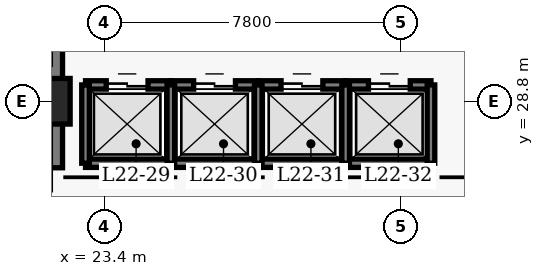
"""IFC4 building model, lengths in metres.
Left out: names, types, materials, properties, quantities, classifications, styles, units other than length and angle.
Written with IfcOpenShell. Run it as: python <this file> out.ifc"""

import sys

from ifc_helpers import new_model, si_unit, direction, frame, frame_2d, origin, origin_2d, place, context, subcontext, project, spatial, rectangle, extrude, element, fill, save


model = new_model("IFC4")
c1 = context("Model", 3, precision=1e-05, world=origin(), true_north=direction((0.0, 1.0)))
c2 = subcontext(c1, "Body", "Model", "MODEL_VIEW")
j1 = project(units=[si_unit("LENGTHUNIT", "METRE"), si_unit("PLANEANGLEUNIT", "RADIAN")], contexts=[c1])
p1 = place(None, origin())
s1 = spatial("IfcSite", under=j1, at=p1, CompositionType="ELEMENT")
p2 = place(p1, origin())
s2 = spatial("IfcBuilding", under=s1, at=p2, CompositionType="ELEMENT")
p3 = place(p2, frame((0.0, 0.0, 91.8)))
s3 = spatial("IfcBuildingStorey", under=s2, at=p3, CompositionType="ELEMENT", Elevation=91.8)
p4 = place(p3, frame((21.9, 27.05, 0.0), z_axis=(0.0, 0.0, 1.0), x_axis=(0.0, 1.0, 0.0)))
e1 = element("IfcWall", 1, at=p4, inside=s3, PredefinedType="SHEAR", context=c2, shape_type="SweptSolid", body=[
    extrude(rectangle(XDim=13.67, YDim=0.8, at=frame_2d((6.835, 0.0))), origin(), (0.0, 0.0, 1.0), 3.8),
])
p5 = place(p3, frame((21.9, 28.8, 0.0), z_axis=(0.0, 0.0, 1.0), x_axis=(1.0, 0.0, 0.0)))
e2 = element("IfcColumn", 2, at=p5, inside=s3, PredefinedType="COLUMN", context=c2, shape_type="SweptSolid", body=[
    extrude(rectangle(XDim=1.2, YDim=1.2, at=origin_2d()), origin(), (0.0, 0.0, 1.0), 3.8),
])
p6 = place(p3, frame((22.905, 29.23, 0.0), z_axis=(0.0, 0.0, 1.0), x_axis=(1.0, 0.0, 0.0)))
e3 = element("IfcWall", 3, at=p6, inside=s3, PredefinedType="SHEAR", context=c2, shape_type="SweptSolid", body=[
    extrude(rectangle(XDim=2.245, YDim=0.22, at=frame_2d((1.123, 0.0))), origin(), (0.0, 0.0, 1.0), 3.8),
])
p7 = place(p6, frame((0.545, 0.0, 0.0)))
e4 = element("IfcOpeningElement", 4, at=p7, cuts=e3, PredefinedType="OPENING", context=c2, shape_type="SweptSolid", body=[
    extrude(rectangle(XDim=1.1, YDim=2.15, at=frame_2d((0.55, 1.075))), frame((0.0, 0.12, 0.0), z_axis=(0.0, -1.0, 0.0), x_axis=(1.0, 0.0, 0.0)), (0.0, 0.0, 1.0), 0.24),
])
p8 = place(p3, frame((22.905, 27.17, 0.0), z_axis=(0.0, 0.0, 1.0), x_axis=(1.0, 0.0, 0.0)))
e5 = element("IfcWall", 5, at=p8, inside=s3, PredefinedType="SHEAR", context=c2, shape_type="SweptSolid", body=[
    extrude(rectangle(XDim=2.245, YDim=0.22, at=frame_2d((1.123, 0.0))), origin(), (0.0, 0.0, 1.0), 3.8),
])
p9 = place(p3, frame((22.905, 27.17, 0.0), z_axis=(0.0, 0.0, 1.0), x_axis=(0.0, 1.0, 0.0)))
e6 = element("IfcWall", 6, at=p9, inside=s3, PredefinedType="SHEAR", context=c2, shape_type="SweptSolid", body=[
    extrude(rectangle(XDim=2.06, YDim=0.2, at=frame_2d((1.03, 0.0))), origin(), (0.0, 0.0, 1.0), 3.8),
])
p10 = place(p3, frame((25.15, 29.23, 0.0), z_axis=(0.0, 0.0, 1.0), x_axis=(1.0, 0.0, 0.0)))
e7 = element("IfcWall", 7, at=p10, inside=s3, PredefinedType="SHEAR", context=c2, shape_type="SweptSolid", body=[
    extrude(rectangle(XDim=2.3, YDim=0.22, at=frame_2d((1.15, 0.0))), origin(), (0.0, 0.0, 1.0), 3.8),
])
p11 = place(p10, frame((0.6, 0.0, 0.0)))
e8 = element("IfcOpeningElement", 8, at=p11, cuts=e7, PredefinedType="OPENING", context=c2, shape_type="SweptSolid", body=[
    extrude(rectangle(XDim=1.1, YDim=2.15, at=frame_2d((0.55, 1.075))), frame((0.0, 0.12, 0.0), z_axis=(0.0, -1.0, 0.0), x_axis=(1.0, 0.0, 0.0)), (0.0, 0.0, 1.0), 0.24),
])
p12 = place(p3, frame((25.15, 27.17, 0.0), z_axis=(0.0, 0.0, 1.0), x_axis=(1.0, 0.0, 0.0)))
e9 = element("IfcWall", 9, at=p12, inside=s3, PredefinedType="SHEAR", context=c2, shape_type="SweptSolid", body=[
    extrude(rectangle(XDim=2.3, YDim=0.22, at=frame_2d((1.15, 0.0))), origin(), (0.0, 0.0, 1.0), 3.8),
])
p13 = place(p3, frame((25.15, 27.17, 0.0), z_axis=(0.0, 0.0, 1.0), x_axis=(0.0, 1.0, 0.0)))
e10 = element("IfcWall", 10, at=p13, inside=s3, PredefinedType="SHEAR", context=c2, shape_type="SweptSolid", body=[
    extrude(rectangle(XDim=2.06, YDim=0.2, at=frame_2d((1.03, 0.0))), origin(), (0.0, 0.0, 1.0), 3.8),
])
p14 = place(p3, frame((27.45, 29.23, 0.0), z_axis=(0.0, 0.0, 1.0), x_axis=(1.0, 0.0, 0.0)))
e11 = element("IfcWall", 11, at=p14, inside=s3, PredefinedType="SHEAR", context=c2, shape_type="SweptSolid", body=[
    extrude(rectangle(XDim=2.3, YDim=0.22, at=frame_2d((1.15, 0.0))), origin(), (0.0, 0.0, 1.0), 3.8),
])
p15 = place(p14, frame((0.6, 0.0, 0.0)))
e12 = element("IfcOpeningElement", 12, at=p15, cuts=e11, PredefinedType="OPENING", context=c2, shape_type="SweptSolid", body=[
    extrude(rectangle(XDim=1.1, YDim=2.15, at=frame_2d((0.55, 1.075))), frame((0.0, 0.12, 0.0), z_axis=(0.0, -1.0, 0.0), x_axis=(1.0, 0.0, 0.0)), (0.0, 0.0, 1.0), 0.24),
])
p16 = place(p3, frame((27.45, 27.17, 0.0), z_axis=(0.0, 0.0, 1.0), x_axis=(1.0, 0.0, 0.0)))
e13 = element("IfcWall", 13, at=p16, inside=s3, PredefinedType="SHEAR", context=c2, shape_type="SweptSolid", body=[
    extrude(rectangle(XDim=2.3, YDim=0.22, at=frame_2d((1.15, 0.0))), origin(), (0.0, 0.0, 1.0), 3.8),
])
p17 = place(p3, frame((27.45, 27.17, 0.0), z_axis=(0.0, 0.0, 1.0), x_axis=(0.0, 1.0, 0.0)))
e14 = element("IfcWall", 14, at=p17, inside=s3, PredefinedType="SHEAR", context=c2, shape_type="SweptSolid", body=[
    extrude(rectangle(XDim=2.06, YDim=0.2, at=frame_2d((1.03, 0.0))), origin(), (0.0, 0.0, 1.0), 3.8),
])
p18 = place(p3, frame((29.75, 29.23, 0.0), z_axis=(0.0, 0.0, 1.0), x_axis=(1.0, 0.0, 0.0)))
e15 = element("IfcWall", 15, at=p18, inside=s3, PredefinedType="SHEAR", context=c2, shape_type="SweptSolid", body=[
    extrude(rectangle(XDim=2.245, YDim=0.22, at=frame_2d((1.123, 0.0))), origin(), (0.0, 0.0, 1.0), 3.8),
])
p19 = place(p18, frame((0.6, 0.0, 0.0)))
e16 = element("IfcOpeningElement", 16, at=p19, cuts=e15, PredefinedType="OPENING", context=c2, shape_type="SweptSolid", body=[
    extrude(rectangle(XDim=1.1, YDim=2.15, at=frame_2d((0.55, 1.075))), frame((0.0, 0.12, 0.0), z_axis=(0.0, -1.0, 0.0), x_axis=(1.0, 0.0, 0.0)), (0.0, 0.0, 1.0), 0.24),
])
p20 = place(p3, frame((29.75, 27.17, 0.0), z_axis=(0.0, 0.0, 1.0), x_axis=(1.0, 0.0, 0.0)))
e17 = element("IfcWall", 17, at=p20, inside=s3, PredefinedType="SHEAR", context=c2, shape_type="SweptSolid", body=[
    extrude(rectangle(XDim=2.245, YDim=0.22, at=frame_2d((1.123, 0.0))), origin(), (0.0, 0.0, 1.0), 3.8),
])
for number, where, z_axis, x_axis in (
    (18, (29.75, 27.17, 0.0), (0.0, 0.0, 1.0), (0.0, 1.0, 0.0)),
    (19, (31.995, 27.17, 0.0), (0.0, 0.0, 1.0), (0.0, 1.0, 0.0)),
):
    element("IfcWall", number, at=place(p3, frame(where, z_axis=z_axis, x_axis=x_axis)), inside=s3, PredefinedType="SHEAR", context=c2, shape_type="SweptSolid", body=[
        extrude(rectangle(XDim=2.06, YDim=0.2, at=frame_2d((1.03, 0.0))), origin(), (0.0, 0.0, 1.0), 3.8),
    ])
p21 = place(p7, origin())
e20 = element("IfcDoor", 20, at=p21, inside=s3, OperationType="DOUBLE_DOOR_SLIDING", PredefinedType="DOOR", context=c2, shape_type="SweptSolid", body=[
    extrude(rectangle(XDim=1.1, YDim=2.15, at=frame_2d((0.55, 1.075))), frame((0.0, 0.025, 0.0), z_axis=(0.0, -1.0, 0.0), x_axis=(1.0, 0.0, 0.0)), (0.0, 0.0, 1.0), 0.05),
])
fill(e4, e20)
p22 = place(p11, origin())
e21 = element("IfcDoor", 21, at=p22, inside=s3, OperationType="DOUBLE_DOOR_SLIDING", PredefinedType="DOOR", context=c2, shape_type="SweptSolid", body=[
    extrude(rectangle(XDim=1.1, YDim=2.15, at=frame_2d((0.55, 1.075))), frame((0.0, 0.025, 0.0), z_axis=(0.0, -1.0, 0.0), x_axis=(1.0, 0.0, 0.0)), (0.0, 0.0, 1.0), 0.05),
])
fill(e8, e21)
p23 = place(p15, origin())
e22 = element("IfcDoor", 22, at=p23, inside=s3, OperationType="DOUBLE_DOOR_SLIDING", PredefinedType="DOOR", context=c2, shape_type="SweptSolid", body=[
    extrude(rectangle(XDim=1.1, YDim=2.15, at=frame_2d((0.55, 1.075))), frame((0.0, 0.025, 0.0), z_axis=(0.0, -1.0, 0.0), x_axis=(1.0, 0.0, 0.0)), (0.0, 0.0, 1.0), 0.05),
])
fill(e12, e22)
p24 = place(p19, origin())
e23 = element("IfcDoor", 23, at=p24, inside=s3, OperationType="DOUBLE_DOOR_SLIDING", PredefinedType="DOOR", context=c2, shape_type="SweptSolid", body=[
    extrude(rectangle(XDim=1.1, YDim=2.15, at=frame_2d((0.55, 1.075))), frame((0.0, 0.025, 0.0), z_axis=(0.0, -1.0, 0.0), x_axis=(1.0, 0.0, 0.0)), (0.0, 0.0, 1.0), 0.05),
])
fill(e16, e23)
save(model, sys.argv[1])
